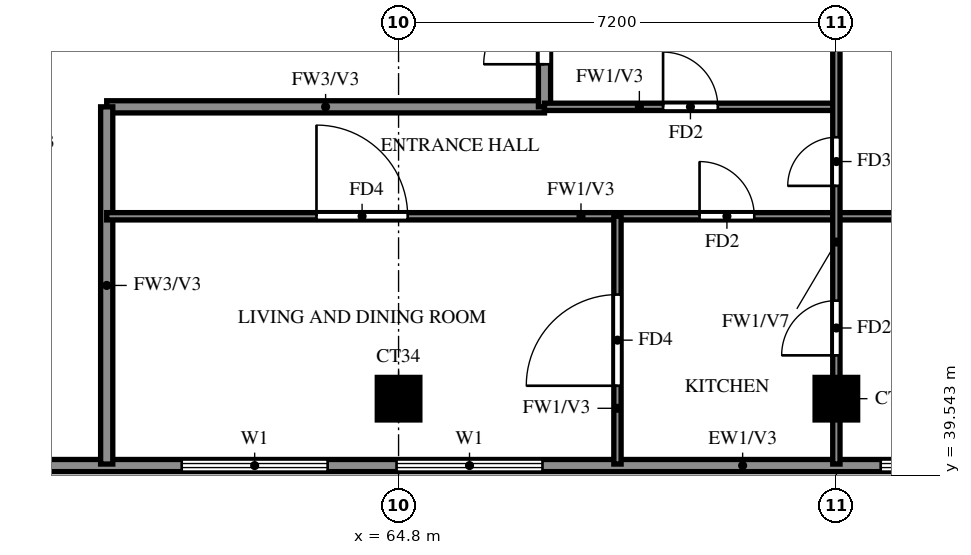
"""IFC4 building model, lengths in metres.
Left out: names, types, materials, properties, quantities, classifications, styles, units other than length and angle.
Written with IfcOpenShell. Run it as: python <this file> out.ifc"""

import sys

from ifc_helpers import new_model, si_unit, direction, frame, frame_2d, origin, origin_2d, place, context, subcontext, project, spatial, rectangle, extrude, source, transform, mapped, element, fill, save


model = new_model("IFC4")
c1 = context("Model", 3, precision=1e-05, world=origin(), true_north=direction((0.0, 1.0)))
c2 = subcontext(c1, "Body", "Model", "MODEL_VIEW")
j1 = project(units=[si_unit("LENGTHUNIT", "METRE"), si_unit("PLANEANGLEUNIT", "RADIAN")], contexts=[c1])
p1 = place(None, origin())
s1 = spatial("IfcSite", under=j1, at=p1, CompositionType="ELEMENT")
p2 = place(p1, origin())
s2 = spatial("IfcBuilding", under=s1, at=p2, CompositionType="ELEMENT")
p3 = place(p2, frame((0.0, 0.0, 260.5)))
s3 = spatial("IfcBuildingStorey", under=s2, at=p3, CompositionType="ELEMENT", Elevation=260.5)
m1 = source(origin(), c2, "Body", "SweptSolid", [
    extrude(rectangle(XDim=0.7, YDim=0.7, at=origin_2d()), origin(), (0.0, 0.0, 1.0), 3.22),
])
for number, where, z_axis, x_axis in (
    (1, (64.8, 40.8, 0.0), (0.0, 0.0, 1.0), (1.0, 0.0, 0.0)),
    (2, (72.0, 40.8, 0.0), (0.0, 0.0, 1.0), (1.0, 0.0, 0.0)),
):
    element("IfcColumn", number, at=place(p3, frame(where, z_axis=z_axis, x_axis=x_axis)), inside=s3, PredefinedType="COLUMN", context=c2, shape_type="MappedRepresentation", body=[
        mapped(m1, transform((0.0, 0.0, 0.0))),
    ])
p4 = place(p3, frame((81.907, 39.87, 0.0), z_axis=(0.0, 0.0, 1.0), x_axis=(-0.777936274417, 0.62834318087, 0.0)))
e3 = element("IfcWall", 3, at=p4, inside=s3, PredefinedType="SOLIDWALL", context=c2, shape_type="SweptSolid", body=[
    extrude(rectangle(XDim=13.099, YDim=0.2, at=frame_2d((6.549, 0.0))), origin(), (0.0, 0.0, 1.0), 3.22),
])
p5 = place(p4, frame((9.938, 0.0, 1.5)))
e4 = element("IfcOpeningElement", 4, at=p5, cuts=e3, PredefinedType="OPENING", context=c2, shape_type="SweptSolid", body=[
    extrude(rectangle(XDim=0.9, YDim=0.9, at=frame_2d((0.45, 0.45))), frame((0.0, 0.11, 0.0), z_axis=(0.0, -1.0, 0.0), x_axis=(1.0, 0.0, 0.0)), (0.0, 0.0, 1.0), 0.22),
])
p6 = place(p3, frame((58.8, 39.7, 0.0), z_axis=(0.0, 0.0, 1.0), x_axis=(1.0, 0.0, 0.0)))
e5 = element("IfcWall", 5, at=p6, inside=s3, PredefinedType="SOLIDWALL", context=c2, shape_type="SweptSolid", body=[
    extrude(rectangle(XDim=23.317, YDim=0.2, at=frame_2d((11.658, 0.0))), origin(), (0.0, 0.0, 1.0), 3.22),
])
p7 = place(p6, frame((2.433, 0.0, 0.6)))
e6 = element("IfcOpeningElement", 6, at=p7, cuts=e5, PredefinedType="OPENING", context=c2, shape_type="SweptSolid", body=[
    extrude(rectangle(XDim=2.4, YDim=2.4, at=frame_2d((1.2, 1.2))), frame((0.0, 0.11, 0.0), z_axis=(0.0, -1.0, 0.0), x_axis=(1.0, 0.0, 0.0)), (0.0, 0.0, 1.0), 0.22),
])
p8 = place(p6, frame((5.967, 0.0, 0.6)))
e7 = element("IfcOpeningElement", 7, at=p8, cuts=e5, PredefinedType="OPENING", context=c2, shape_type="SweptSolid", body=[
    extrude(rectangle(XDim=2.4, YDim=2.4, at=frame_2d((1.2, 1.2))), frame((0.0, 0.11, 0.0), z_axis=(0.0, -1.0, 0.0), x_axis=(1.0, 0.0, 0.0)), (0.0, 0.0, 1.0), 0.22),
])
p9 = place(p6, frame((13.929, 0.0, 0.6)))
e8 = element("IfcOpeningElement", 8, at=p9, cuts=e5, PredefinedType="OPENING", context=c2, shape_type="SweptSolid", body=[
    extrude(rectangle(XDim=2.4, YDim=2.4, at=frame_2d((1.2, 1.2))), frame((0.0, 0.11, 0.0), z_axis=(0.0, -1.0, 0.0), x_axis=(1.0, 0.0, 0.0)), (0.0, 0.0, 1.0), 0.22),
])
p10 = place(p6, frame((16.958, 0.0, 0.6)))
e9 = element("IfcOpeningElement", 9, at=p10, cuts=e5, PredefinedType="OPENING", context=c2, shape_type="SweptSolid", body=[
    extrude(rectangle(XDim=2.4, YDim=2.4, at=frame_2d((1.2, 1.2))), frame((0.0, 0.11, 0.0), z_axis=(0.0, -1.0, 0.0), x_axis=(1.0, 0.0, 0.0)), (0.0, 0.0, 1.0), 0.22),
])
p11 = place(p6, frame((19.988, 0.0, 0.6)))
e10 = element("IfcOpeningElement", 10, at=p11, cuts=e5, PredefinedType="OPENING", context=c2, shape_type="SweptSolid", body=[
    extrude(rectangle(XDim=2.4, YDim=2.4, at=frame_2d((1.2, 1.2))), frame((0.0, 0.11, 0.0), z_axis=(0.0, -1.0, 0.0), x_axis=(1.0, 0.0, 0.0)), (0.0, 0.0, 1.0), 0.22),
])
p12 = place(p3, frame((60.0, 45.6, 0.0), z_axis=(0.0, 0.0, 1.0), x_axis=(1.0, 0.0, 0.0)))
e11 = element("IfcWall", 11, at=p12, inside=s3, PredefinedType="SOLIDWALL", context=c2, shape_type="SweptSolid", body=[
    extrude(rectangle(XDim=7.2, YDim=0.2, at=frame_2d((3.6, 0.0))), origin(), (0.0, 0.0, 1.0), 3.22),
])
p13 = place(p3, frame((60.0, 39.725, 0.0), z_axis=(0.0, 0.0, 1.0), x_axis=(0.0, 1.0, 0.0)))
e12 = element("IfcWall", 12, at=p13, inside=s3, PredefinedType="SOLIDWALL", context=c2, shape_type="SweptSolid", body=[
    extrude(rectangle(XDim=5.875, YDim=0.2, at=frame_2d((2.938, 0.0))), origin(), (0.0, 0.0, 1.0), 3.22),
])
p14 = place(p3, frame((67.2, 45.6, 0.0), z_axis=(0.0, 0.0, 1.0), x_axis=(0.0, 1.0, 0.0)))
e13 = element("IfcWall", 13, at=p14, inside=s3, PredefinedType="SOLIDWALL", context=c2, shape_type="SweptSolid", body=[
    extrude(rectangle(XDim=12.0, YDim=0.2, at=frame_2d((6.0, 0.0))), origin(), (0.0, 0.0, 1.0), 3.22),
])
p15 = place(p14, frame((10.3, 0.0, 0.0)))
e14 = element("IfcOpeningElement", 14, at=p15, cuts=e13, PredefinedType="OPENING", context=c2, shape_type="SweptSolid", body=[
    extrude(rectangle(XDim=1.0, YDim=2.1, at=frame_2d((0.5, 1.05))), frame((0.0, 0.11, 0.0), z_axis=(0.0, -1.0, 0.0), x_axis=(1.0, 0.0, 0.0)), (0.0, 0.0, 1.0), 0.22),
])
p16 = place(p14, frame((0.7, 0.0, 0.0)))
e15 = element("IfcOpeningElement", 15, at=p16, cuts=e13, PredefinedType="OPENING", context=c2, shape_type="SweptSolid", body=[
    extrude(rectangle(XDim=1.0, YDim=2.1, at=frame_2d((0.5, 1.05))), frame((0.0, 0.11, 0.0), z_axis=(0.0, -1.0, 0.0), x_axis=(1.0, 0.0, 0.0)), (0.0, 0.0, 1.0), 0.22),
])
p17 = place(p3, frame((60.0, 43.8, 0.0), z_axis=(0.0, 0.0, 1.0), x_axis=(1.0, 0.0, 0.0)))
e16 = element("IfcWall", 16, at=p17, inside=s3, PredefinedType="PARTITIONING", context=c2, shape_type="SweptSolid", body=[
    extrude(rectangle(XDim=15.6, YDim=0.12, at=frame_2d((7.8, 0.0))), origin(), (0.0, 0.0, 1.0), 3.22),
])
p18 = place(p17, frame((9.75, 0.0, 0.0)))
e17 = element("IfcOpeningElement", 17, at=p18, cuts=e16, PredefinedType="OPENING", context=c2, shape_type="SweptSolid", body=[
    extrude(rectangle(XDim=0.9, YDim=2.1, at=frame_2d((0.45, 1.05))), frame((0.0, 0.07, 0.0), z_axis=(0.0, -1.0, 0.0), x_axis=(1.0, 0.0, 0.0)), (0.0, 0.0, 1.0), 0.14),
])
p19 = place(p17, frame((3.45, 0.0, 0.0)))
e18 = element("IfcOpeningElement", 18, at=p19, cuts=e16, PredefinedType="OPENING", context=c2, shape_type="SweptSolid", body=[
    extrude(rectangle(XDim=1.5, YDim=2.1, at=frame_2d((0.75, 1.05))), frame((0.0, 0.07, 0.0), z_axis=(0.0, -1.0, 0.0), x_axis=(1.0, 0.0, 0.0)), (0.0, 0.0, 1.0), 0.14),
])
p20 = place(p17, frame((13.4, 0.0, 0.0)))
e19 = element("IfcOpeningElement", 19, at=p20, cuts=e16, PredefinedType="OPENING", context=c2, shape_type="SweptSolid", body=[
    extrude(rectangle(XDim=0.8, YDim=2.1, at=frame_2d((0.4, 1.05))), frame((0.0, 0.07, 0.0), z_axis=(0.0, -1.0, 0.0), x_axis=(1.0, 0.0, 0.0)), (0.0, 0.0, 1.0), 0.14),
])
p21 = place(p3, frame((67.2, 45.6, 0.0), z_axis=(0.0, 0.0, 1.0), x_axis=(1.0, 0.0, 0.0)))
e20 = element("IfcWall", 20, at=p21, inside=s3, PredefinedType="PARTITIONING", context=c2, shape_type="SweptSolid", body=[
    extrude(rectangle(XDim=4.8, YDim=0.12, at=frame_2d((2.4, 0.0))), origin(), (0.0, 0.0, 1.0), 3.22),
])
p22 = place(p21, frame((1.95, 0.0, 0.0)))
e21 = element("IfcOpeningElement", 21, at=p22, cuts=e20, PredefinedType="OPENING", context=c2, shape_type="SweptSolid", body=[
    extrude(rectangle(XDim=0.9, YDim=2.1, at=frame_2d((0.45, 1.05))), frame((0.0, 0.07, 0.0), z_axis=(0.0, -1.0, 0.0), x_axis=(1.0, 0.0, 0.0)), (0.0, 0.0, 1.0), 0.14),
])
p23 = place(p3, frame((68.4, 39.725, 0.0), z_axis=(0.0, 0.0, 1.0), x_axis=(0.0, 1.0, 0.0)))
e22 = element("IfcWall", 22, at=p23, inside=s3, PredefinedType="PARTITIONING", context=c2, shape_type="SweptSolid", body=[
    extrude(rectangle(XDim=4.075, YDim=0.12, at=frame_2d((2.038, 0.0))), origin(), (0.0, 0.0, 1.0), 3.22),
])
p24 = place(p23, frame((1.288, 0.0, 0.0)))
e23 = element("IfcOpeningElement", 23, at=p24, cuts=e22, PredefinedType="OPENING", context=c2, shape_type="SweptSolid", body=[
    extrude(rectangle(XDim=1.5, YDim=2.1, at=frame_2d((0.75, 1.05))), frame((0.0, 0.07, 0.0), z_axis=(0.0, -1.0, 0.0), x_axis=(1.0, 0.0, 0.0)), (0.0, 0.0, 1.0), 0.14),
])
p25 = place(p3, frame((72.0, 39.725, 0.0), z_axis=(0.0, 0.0, 1.0), x_axis=(0.0, 1.0, 0.0)))
e24 = element("IfcWall", 24, at=p25, inside=s3, PredefinedType="PARTITIONING", context=c2, shape_type="SweptSolid", body=[
    extrude(rectangle(XDim=8.114, YDim=0.12, at=frame_2d((4.057, 0.0))), origin(), (0.0, 0.0, 1.0), 2.32),
])
p26 = place(p25, frame((1.788, 0.0, 0.0)))
e25 = element("IfcOpeningElement", 25, at=p26, cuts=e24, PredefinedType="OPENING", context=c2, shape_type="SweptSolid", body=[
    extrude(rectangle(XDim=0.9, YDim=2.1, at=frame_2d((0.45, 1.05))), frame((0.0, 0.07, 0.0), z_axis=(0.0, -1.0, 0.0), x_axis=(1.0, 0.0, 0.0)), (0.0, 0.0, 1.0), 0.14),
])
p27 = place(p25, frame((4.575, 0.0, 0.0)))
e26 = element("IfcOpeningElement", 26, at=p27, cuts=e24, PredefinedType="OPENING", context=c2, shape_type="SweptSolid", body=[
    extrude(rectangle(XDim=0.8, YDim=2.1, at=frame_2d((0.4, 1.05))), frame((0.0, 0.07, 0.0), z_axis=(0.0, -1.0, 0.0), x_axis=(1.0, 0.0, 0.0)), (0.0, 0.0, 1.0), 0.14),
])
p28 = place(p7, origin())
e27 = element("IfcWindow", 27, at=p28, inside=s3, PartitioningType="DOUBLE_PANEL_VERTICAL", PredefinedType="WINDOW", context=c2, shape_type="SweptSolid", body=[
    extrude(rectangle(XDim=2.4, YDim=2.4, at=frame_2d((1.2, 1.2))), frame((0.0, 0.03, 0.0), z_axis=(0.0, -1.0, 0.0), x_axis=(1.0, 0.0, 0.0)), (0.0, 0.0, 1.0), 0.06),
])
fill(e6, e27)
p29 = place(p8, origin())
e28 = element("IfcWindow", 28, at=p29, inside=s3, PartitioningType="DOUBLE_PANEL_VERTICAL", PredefinedType="WINDOW", context=c2, shape_type="SweptSolid", body=[
    extrude(rectangle(XDim=2.4, YDim=2.4, at=frame_2d((1.2, 1.2))), frame((0.0, 0.03, 0.0), z_axis=(0.0, -1.0, 0.0), x_axis=(1.0, 0.0, 0.0)), (0.0, 0.0, 1.0), 0.06),
])
fill(e7, e28)
p30 = place(p9, origin())
e29 = element("IfcWindow", 29, at=p30, inside=s3, PartitioningType="DOUBLE_PANEL_VERTICAL", PredefinedType="WINDOW", context=c2, shape_type="SweptSolid", body=[
    extrude(rectangle(XDim=2.4, YDim=2.4, at=frame_2d((1.2, 1.2))), frame((0.0, 0.03, 0.0), z_axis=(0.0, -1.0, 0.0), x_axis=(1.0, 0.0, 0.0)), (0.0, 0.0, 1.0), 0.06),
])
fill(e8, e29)
p31 = place(p24, origin())
e30 = element("IfcDoor", 30, at=p31, inside=s3, OperationType="SINGLE_SWING_LEFT", PredefinedType="DOOR", context=c2, shape_type="SweptSolid", body=[
    extrude(rectangle(XDim=1.5, YDim=2.1, at=frame_2d((0.75, 1.05))), frame((0.0, 0.025, 0.0), z_axis=(0.0, -1.0, 0.0), x_axis=(1.0, 0.0, 0.0)), (0.0, 0.0, 1.0), 0.05),
])
fill(e23, e30)
p32 = place(p22, origin())
e31 = element("IfcDoor", 31, at=p32, inside=s3, OperationType="SINGLE_SWING_LEFT", PredefinedType="DOOR", context=c2, shape_type="SweptSolid", body=[
    extrude(rectangle(XDim=0.9, YDim=2.1, at=frame_2d((0.45, 1.05))), frame((0.0, 0.025, 0.0), z_axis=(0.0, -1.0, 0.0), x_axis=(1.0, 0.0, 0.0)), (0.0, 0.0, 1.0), 0.05),
])
fill(e21, e31)
p33 = place(p16, origin())
e32 = element("IfcDoor", 32, at=p33, inside=s3, OperationType="SINGLE_SWING_RIGHT", PredefinedType="DOOR", context=c2, shape_type="SweptSolid", body=[
    extrude(rectangle(XDim=1.0, YDim=2.1, at=frame_2d((0.5, 1.05))), frame((0.0, 0.025, 0.0), z_axis=(0.0, -1.0, 0.0), x_axis=(1.0, 0.0, 0.0)), (0.0, 0.0, 1.0), 0.05),
])
fill(e15, e32)
p34 = place(p18, origin())
e33 = element("IfcDoor", 33, at=p34, inside=s3, OperationType="SINGLE_SWING_LEFT", PredefinedType="DOOR", context=c2, shape_type="SweptSolid", body=[
    extrude(rectangle(XDim=0.9, YDim=2.1, at=frame_2d((0.45, 1.05))), frame((0.0, 0.025, 0.0), z_axis=(0.0, -1.0, 0.0), x_axis=(1.0, 0.0, 0.0)), (0.0, 0.0, 1.0), 0.05),
])
fill(e17, e33)
p35 = place(p19, origin())
e34 = element("IfcDoor", 34, at=p35, inside=s3, OperationType="SINGLE_SWING_LEFT", PredefinedType="DOOR", context=c2, shape_type="SweptSolid", body=[
    extrude(rectangle(XDim=1.5, YDim=2.1, at=frame_2d((0.75, 1.05))), frame((0.0, 0.025, 0.0), z_axis=(0.0, -1.0, 0.0), x_axis=(1.0, 0.0, 0.0)), (0.0, 0.0, 1.0), 0.05),
])
fill(e18, e34)
p36 = place(p26, origin())
e35 = element("IfcDoor", 35, at=p36, inside=s3, OperationType="SINGLE_SWING_LEFT", PredefinedType="DOOR", context=c2, shape_type="SweptSolid", body=[
    extrude(rectangle(XDim=0.9, YDim=2.1, at=frame_2d((0.45, 1.05))), frame((0.0, 0.025, 0.0), z_axis=(0.0, -1.0, 0.0), x_axis=(1.0, 0.0, 0.0)), (0.0, 0.0, 1.0), 0.05),
])
fill(e25, e35)
p37 = place(p27, origin())
e36 = element("IfcDoor", 36, at=p37, inside=s3, OperationType="SINGLE_SWING_LEFT", PredefinedType="DOOR", context=c2, shape_type="SweptSolid", body=[
    extrude(rectangle(XDim=0.8, YDim=2.1, at=frame_2d((0.4, 1.05))), frame((0.0, 0.025, 0.0), z_axis=(0.0, -1.0, 0.0), x_axis=(1.0, 0.0, 0.0)), (0.0, 0.0, 1.0), 0.05),
])
fill(e26, e36)
save(model, sys.argv[1])
